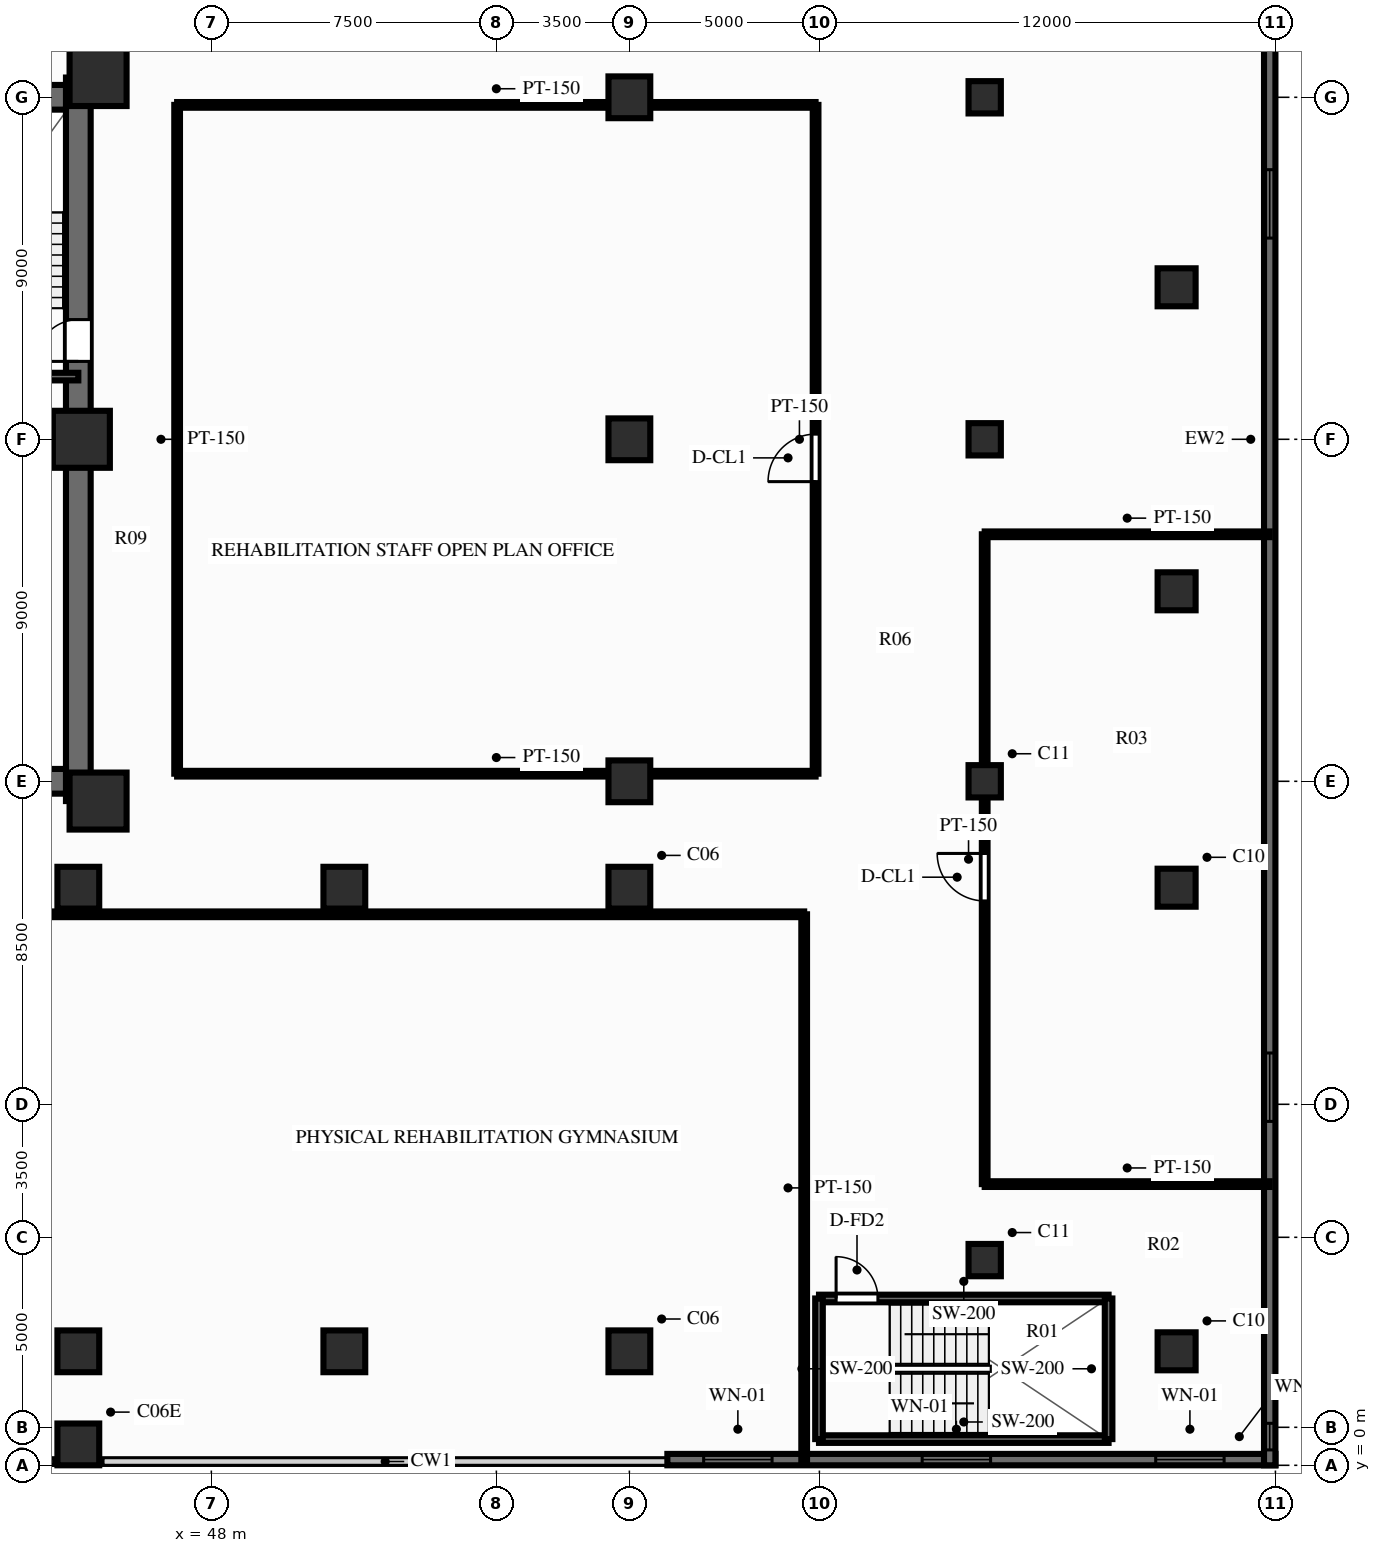
"""IFC4 building model, lengths in metres.
Left out: names, types, materials, properties, quantities, classifications, styles, units other than length and angle.
Written with IfcOpenShell. Run it as: python <this file> out.ifc"""

import sys

from ifc_helpers import new_model, si_unit, direction, frame, frame_2d, origin, origin_2d, place, context, subcontext, project, spatial, rectangle, circle, extrude, source, transform, mapped, element, fill, save


model = new_model("IFC4")
c1 = context("Model", 3, precision=1e-05, world=origin(), true_north=direction((0.0, 1.0)))
c2 = subcontext(c1, "Body", "Model", "MODEL_VIEW")
j1 = project(units=[si_unit("LENGTHUNIT", "METRE"), si_unit("PLANEANGLEUNIT", "RADIAN")], contexts=[c1])
p1 = place(None, origin())
s1 = spatial("IfcSite", under=j1, at=p1, CompositionType="ELEMENT")
p2 = place(p1, origin())
s2 = spatial("IfcBuilding", under=s1, at=p2, CompositionType="ELEMENT")
p3 = place(p2, frame((0.0, 0.0, 11.4)))
s3 = spatial("IfcBuildingStorey", under=s2, at=p3, CompositionType="ELEMENT", Elevation=11.4)
p4 = place(p3, frame((44.5, 17.48, 0.0), z_axis=(0.0, 0.0, 1.0), x_axis=(0.0, 1.0, 0.0)))
e1 = element("IfcWall", 1, at=p4, inside=s3, PredefinedType="SHEAR", context=c2, shape_type="SweptSolid", body=[
    extrude(rectangle(XDim=19.04, YDim=0.65, at=frame_2d((9.52, 0.0))), origin(), (0.0, 0.0, 1.0), 3.6),
])
p5 = place(p4, frame((12.67, 0.0, 0.0), z_axis=(0.0, 0.0, 1.0), x_axis=(-1.0, 0.0, 0.0)))
e2 = element("IfcOpeningElement", 2, at=p5, cuts=e1, PredefinedType="OPENING", context=c2, shape_type="SweptSolid", body=[
    extrude(rectangle(XDim=1.1, YDim=2.15, at=frame_2d((0.55, 1.075))), frame((0.0, 0.337, 0.0), z_axis=(0.0, -1.0, 0.0), x_axis=(1.0, 0.0, 0.0)), (0.0, 0.0, 1.0), 0.674),
])
p6 = place(p3, frame((31.825, 18.0, 0.0), z_axis=(0.0, 0.0, 1.0), x_axis=(1.0, 0.0, 0.0)))
e3 = element("IfcWall", 3, at=p6, inside=s3, PredefinedType="SHEAR", context=c2, shape_type="SweptSolid", body=[
    extrude(rectangle(XDim=12.35, YDim=0.65, at=frame_2d((6.175, 0.0))), origin(), (0.0, 0.0, 1.0), 3.6),
])
p7 = place(p3, frame((31.825, 36.0, 0.0), z_axis=(0.0, 0.0, 1.0), x_axis=(1.0, 0.0, 0.0)))
e4 = element("IfcWall", 4, at=p7, inside=s3, PredefinedType="SHEAR", context=c2, shape_type="SweptSolid", body=[
    extrude(rectangle(XDim=12.35, YDim=0.65, at=frame_2d((6.175, 0.0))), origin(), (0.0, 0.0, 1.0), 3.6),
])
p8 = place(p7, frame((5.125, 0.0, 0.0), z_axis=(0.0, 0.0, 1.0), x_axis=(-1.0, 0.0, 0.0)))
e5 = element("IfcOpeningElement", 5, at=p8, cuts=e4, PredefinedType="OPENING", context=c2, shape_type="SweptSolid", body=[
    extrude(rectangle(XDim=1.4, YDim=2.15, at=frame_2d((0.7, 1.075))), frame((0.0, 0.337, 0.0), z_axis=(0.0, -1.0, 0.0), x_axis=(1.0, 0.0, 0.0)), (0.0, 0.0, 1.0), 0.674),
])
m1 = source(origin(), c2, "Body", "SweptSolid", [
    extrude(rectangle(XDim=1.5, YDim=1.5, at=origin_2d()), origin(), (0.0, 0.0, 1.0), 3.6),
])
for number, where, z_axis, x_axis in (
    (6, (45.02, 17.48, 0.0), (0.0, 0.0, 1.0), (1.0, 0.0, 0.0)),
    (7, (45.02, 36.52, 0.0), (0.0, 0.0, 1.0), (1.0, 0.0, 0.0)),
    (8, (44.58, 27.0, 0.0), (0.0, 0.0, 1.0), (1.0, 0.0, 0.0)),
):
    element("IfcColumn", number, at=place(p3, frame(where, z_axis=z_axis, x_axis=x_axis)), inside=s3, PredefinedType="COLUMN", context=c2, shape_type="MappedRepresentation", body=[
        mapped(m1, transform((0.0, 0.0, 0.0), scale=1.0)),
    ])
m2 = source(origin(), c2, "Body", "SweptSolid", [
    extrude(circle(Radius=0.5, at=origin_2d()), origin(), (0.0, 0.0, 1.0), 3.6),
])
for number, where, z_axis, x_axis in (
    (9, (73.4, 3.0, 0.0), (0.0, 0.0, 1.0), (1.0, 0.0, 0.0)),
    (10, (73.4, 15.2, 0.0), (0.0, 0.0, 1.0), (1.0, 0.0, 0.0)),
    (11, (73.4, 23.0, 0.0), (0.0, 0.0, 1.0), (1.0, 0.0, 0.0)),
    (12, (73.4, 31.0, 0.0), (0.0, 0.0, 1.0), (1.0, 0.0, 0.0)),
):
    element("IfcColumn", number, at=place(p3, frame(where, z_axis=z_axis, x_axis=x_axis)), inside=s3, PredefinedType="COLUMN", context=c2, shape_type="MappedRepresentation", body=[
        mapped(m2, transform((0.0, 0.0, 0.0), scale=1.0)),
    ])
m3 = source(origin(), c2, "Body", "SweptSolid", [
    extrude(circle(Radius=0.425, at=origin_2d()), origin(), (0.0, 0.0, 1.0), 3.6),
])
for number, where, z_axis, x_axis in (
    (13, (68.35, 5.4, 0.0), (0.0, 0.0, 1.0), (1.0, 0.0, 0.0)),
    (14, (68.35, 18.0, 0.0), (0.0, 0.0, 1.0), (1.0, 0.0, 0.0)),
    (15, (68.35, 27.0, 0.0), (0.0, 0.0, 1.0), (1.0, 0.0, 0.0)),
    (16, (68.35, 36.0, 0.0), (0.0, 0.0, 1.0), (1.0, 0.0, 0.0)),
):
    element("IfcColumn", number, at=place(p3, frame(where, z_axis=z_axis, x_axis=x_axis)), inside=s3, PredefinedType="COLUMN", context=c2, shape_type="MappedRepresentation", body=[
        mapped(m3, transform((0.0, 0.0, 0.0), scale=1.0)),
    ])
m4 = source(origin(), c2, "Body", "SweptSolid", [
    extrude(rectangle(XDim=1.1, YDim=1.1, at=origin_2d()), origin(), (0.0, 0.0, 1.0), 3.6),
])
for number, where, z_axis, x_axis in (
    (17, (59.0, 3.0, 0.0), (0.0, 0.0, 1.0), (1.0, 0.0, 0.0)),
    (18, (59.0, 15.2, 0.0), (0.0, 0.0, 1.0), (1.0, 0.0, 0.0)),
    (19, (59.0, 18.0, 0.0), (0.0, 0.0, 1.0), (1.0, 0.0, 0.0)),
    (20, (59.0, 27.0, 0.0), (0.0, 0.0, 1.0), (1.0, 0.0, 0.0)),
    (21, (59.0, 36.0, 0.0), (0.0, 0.0, 1.0), (1.0, 0.0, 0.0)),
    (22, (44.5, 0.55, 0.0), (0.0, 0.0, 1.0), (1.0, 0.0, 0.0)),
    (23, (44.5, 3.0, 0.0), (0.0, 0.0, 1.0), (1.0, 0.0, 0.0)),
    (24, (44.5, 15.2, 0.0), (0.0, 0.0, 1.0), (1.0, 0.0, 0.0)),
    (25, (51.5, 3.0, 0.0), (0.0, 0.0, 1.0), (1.0, 0.0, 0.0)),
    (26, (51.5, 15.2, 0.0), (0.0, 0.0, 1.0), (1.0, 0.0, 0.0)),
):
    element("IfcColumn", number, at=place(p3, frame(where, z_axis=z_axis, x_axis=x_axis)), inside=s3, PredefinedType="COLUMN", context=c2, shape_type="MappedRepresentation", body=[
        mapped(m4, transform((0.0, 0.0, 0.0), scale=1.0)),
    ])
p9 = place(p3, frame((60.0, 0.15, 0.0), z_axis=(0.0, 0.0, 1.0), x_axis=(1.0, 0.0, 0.0)))
e27 = element("IfcWall", 27, at=p9, inside=s3, PredefinedType="SOLIDWALL", context=c2, shape_type="SweptSolid", body=[
    extrude(rectangle(XDim=16.0, YDim=0.3, at=frame_2d((8.0, 0.0))), origin(), (0.0, 0.0, 1.0), 2.88),
])
p10 = place(p9, frame((0.955, 0.0, 0.85)))
e28 = element("IfcOpeningElement", 28, at=p10, cuts=e27, PredefinedType="OPENING", context=c2, shape_type="SweptSolid", body=[
    extrude(rectangle(XDim=1.8, YDim=1.65, at=frame_2d((0.9, 0.825))), frame((0.0, 0.162, 0.0), z_axis=(0.0, -1.0, 0.0), x_axis=(1.0, 0.0, 0.0)), (0.0, 0.0, 1.0), 0.324),
])
p11 = place(p9, frame((6.705, 0.0, 0.85)))
e29 = element("IfcOpeningElement", 29, at=p11, cuts=e27, PredefinedType="OPENING", context=c2, shape_type="SweptSolid", body=[
    extrude(rectangle(XDim=1.8, YDim=1.65, at=frame_2d((0.9, 0.825))), frame((0.0, 0.162, 0.0), z_axis=(0.0, -1.0, 0.0), x_axis=(1.0, 0.0, 0.0)), (0.0, 0.0, 1.0), 0.324),
])
p12 = place(p9, frame((12.85, 0.0, 0.85)))
e30 = element("IfcOpeningElement", 30, at=p12, cuts=e27, PredefinedType="OPENING", context=c2, shape_type="SweptSolid", body=[
    extrude(rectangle(XDim=1.8, YDim=1.65, at=frame_2d((0.9, 0.825))), frame((0.0, 0.162, 0.0), z_axis=(0.0, -1.0, 0.0), x_axis=(1.0, 0.0, 0.0)), (0.0, 0.0, 1.0), 0.324),
])
p13 = place(p3, frame((75.85, 0.0, 0.0), z_axis=(0.0, 0.0, 1.0), x_axis=(0.0, 1.0, 0.0)))
e31 = element("IfcWall", 31, at=p13, inside=s3, PredefinedType="SOLIDWALL", context=c2, shape_type="SweptSolid", body=[
    extrude(rectangle(XDim=54.0, YDim=0.3, at=frame_2d((27.0, 0.0))), origin(), (0.0, 0.0, 1.0), 2.88),
])
p14 = place(p13, frame((0.405, 0.0, 0.85)))
e32 = element("IfcOpeningElement", 32, at=p14, cuts=e31, PredefinedType="OPENING", context=c2, shape_type="SweptSolid", body=[
    extrude(rectangle(XDim=0.7, YDim=1.5, at=frame_2d((0.35, 0.75))), frame((0.0, 0.162, 0.0), z_axis=(0.0, -1.0, 0.0), x_axis=(1.0, 0.0, 0.0)), (0.0, 0.0, 1.0), 0.324),
])
p15 = place(p13, frame((9.05, 0.0, 0.85)))
e33 = element("IfcOpeningElement", 33, at=p15, cuts=e31, PredefinedType="OPENING", context=c2, shape_type="SweptSolid", body=[
    extrude(rectangle(XDim=1.8, YDim=1.65, at=frame_2d((0.9, 0.825))), frame((0.0, 0.162, 0.0), z_axis=(0.0, -1.0, 0.0), x_axis=(1.0, 0.0, 0.0)), (0.0, 0.0, 1.0), 0.324),
])
p16 = place(p13, frame((32.295, 0.0, 0.85)))
e34 = element("IfcOpeningElement", 34, at=p16, cuts=e31, PredefinedType="OPENING", context=c2, shape_type="SweptSolid", body=[
    extrude(rectangle(XDim=1.8, YDim=1.65, at=frame_2d((0.9, 0.825))), frame((0.0, 0.162, 0.0), z_axis=(0.0, -1.0, 0.0), x_axis=(1.0, 0.0, 0.0)), (0.0, 0.0, 1.0), 0.324),
])
p17 = place(p3, frame((40.57, 28.65, 0.0), z_axis=(0.0, 0.0, 1.0), x_axis=(1.0, 0.0, 0.0)))
e35 = element("IfcWall", 35, at=p17, inside=s3, PredefinedType="SOLIDWALL", context=c2, shape_type="SweptSolid", body=[
    extrude(rectangle(XDim=3.93, YDim=0.2, at=frame_2d((1.965, 0.0))), origin(), (0.0, 0.0, 1.0), 3.25),
])
p18 = place(p3, frame((63.99, 0.69, 0.0), z_axis=(0.0, 0.0, 1.0), x_axis=(1.0, 0.0, 0.0)))
e36 = element("IfcWall", 36, at=p18, inside=s3, PredefinedType="SOLIDWALL", context=c2, shape_type="SweptSolid", body=[
    extrude(rectangle(XDim=7.62, YDim=0.2, at=frame_2d((3.81, 0.0))), origin(), (0.0, 0.0, 1.0), 3.25),
])
p19 = place(p3, frame((63.99, 4.39, 0.0), z_axis=(0.0, 0.0, 1.0), x_axis=(1.0, 0.0, 0.0)))
e37 = element("IfcWall", 37, at=p19, inside=s3, PredefinedType="SOLIDWALL", context=c2, shape_type="SweptSolid", body=[
    extrude(rectangle(XDim=7.62, YDim=0.2, at=frame_2d((3.81, 0.0))), origin(), (0.0, 0.0, 1.0), 3.25),
])
p20 = place(p19, frame((0.45, 0.0, 0.0)))
e38 = element("IfcOpeningElement", 38, at=p20, cuts=e37, PredefinedType="OPENING", context=c2, shape_type="SweptSolid", body=[
    extrude(rectangle(XDim=1.1, YDim=2.15, at=frame_2d((0.55, 1.075))), frame((0.0, 0.112, 0.0), z_axis=(0.0, -1.0, 0.0), x_axis=(1.0, 0.0, 0.0)), (0.0, 0.0, 1.0), 0.224),
])
for number, where, z_axis, x_axis in (
    (39, (63.99, 0.69, 0.0), (0.0, 0.0, 1.0), (0.0, 1.0, 0.0)),
    (40, (71.61, 0.69, 0.0), (0.0, 0.0, 1.0), (0.0, 1.0, 0.0)),
):
    element("IfcWall", number, at=place(p3, frame(where, z_axis=z_axis, x_axis=x_axis)), inside=s3, PredefinedType="SOLIDWALL", context=c2, shape_type="SweptSolid", body=[
        extrude(rectangle(XDim=3.7, YDim=0.2, at=frame_2d((1.85, 0.0))), origin(), (0.0, 0.0, 1.0), 3.25),
    ])
p21 = place(p3, frame((19.9, 14.5, 0.0), z_axis=(0.0, 0.0, 1.0), x_axis=(1.0, 0.0, 0.0)))
e41 = element("IfcWall", 41, at=p21, inside=s3, PredefinedType="PARTITIONING", context=c2, shape_type="SweptSolid", body=[
    extrude(rectangle(XDim=43.7, YDim=0.15, at=frame_2d((21.85, 0.0))), origin(), (0.0, 0.0, 1.0), 3.25),
])
p22 = place(p21, frame((19.92, 0.0, 0.0)))
e42 = element("IfcOpeningElement", 42, at=p22, cuts=e41, PredefinedType="OPENING", context=c2, shape_type="SweptSolid", body=[
    extrude(rectangle(XDim=1.25, YDim=2.15, at=frame_2d((0.625, 1.075))), frame((0.0, 0.087, 0.0), z_axis=(0.0, -1.0, 0.0), x_axis=(1.0, 0.0, 0.0)), (0.0, 0.0, 1.0), 0.174),
])
p23 = place(p3, frame((63.6, 0.1, 0.0), z_axis=(0.0, 0.0, 1.0), x_axis=(0.0, 1.0, 0.0)))
e43 = element("IfcWall", 43, at=p23, inside=s3, PredefinedType="PARTITIONING", context=c2, shape_type="SweptSolid", body=[
    extrude(rectangle(XDim=14.4, YDim=0.15, at=frame_2d((7.2, 0.0))), origin(), (0.0, 0.0, 1.0), 3.25),
])
for number, where, z_axis, x_axis in (
    (44, (68.35, 7.4, 0.0), (0.0, 0.0, 1.0), (1.0, 0.0, 0.0)),
    (45, (68.35, 24.5, 0.0), (0.0, 0.0, 1.0), (1.0, 0.0, 0.0)),
):
    element("IfcWall", number, at=place(p3, frame(where, z_axis=z_axis, x_axis=x_axis)), inside=s3, PredefinedType="PARTITIONING", context=c2, shape_type="SweptSolid", body=[
        extrude(rectangle(XDim=7.5, YDim=0.15, at=frame_2d((3.75, 0.0))), origin(), (0.0, 0.0, 1.0), 3.25),
    ])
p24 = place(p3, frame((68.35, 7.4, 0.0), z_axis=(0.0, 0.0, 1.0), x_axis=(0.0, 1.0, 0.0)))
e46 = element("IfcWall", 46, at=p24, inside=s3, PredefinedType="PARTITIONING", context=c2, shape_type="SweptSolid", body=[
    extrude(rectangle(XDim=17.1, YDim=0.15, at=frame_2d((8.55, 0.0))), origin(), (0.0, 0.0, 1.0), 2.84),
])
p25 = place(p24, frame((7.452, 0.0, 0.0)))
e47 = element("IfcOpeningElement", 47, at=p25, cuts=e46, PredefinedType="OPENING", context=c2, shape_type="SweptSolid", body=[
    extrude(rectangle(XDim=1.25, YDim=2.15, at=frame_2d((0.625, 1.075))), frame((0.0, 0.087, 0.0), z_axis=(0.0, -1.0, 0.0), x_axis=(1.0, 0.0, 0.0)), (0.0, 0.0, 1.0), 0.174),
])
for number, where, z_axis, x_axis in (
    (48, (47.1, 18.2, 0.0), (0.0, 0.0, 1.0), (1.0, 0.0, 0.0)),
    (49, (47.1, 35.8, 0.0), (0.0, 0.0, 1.0), (1.0, 0.0, 0.0)),
):
    element("IfcWall", number, at=place(p3, frame(where, z_axis=z_axis, x_axis=x_axis)), inside=s3, PredefinedType="PARTITIONING", context=c2, shape_type="SweptSolid", body=[
        extrude(rectangle(XDim=16.8, YDim=0.15, at=frame_2d((8.4, 0.0))), origin(), (0.0, 0.0, 1.0), 3.25),
    ])
p26 = place(p3, frame((47.1, 18.2, 0.0), z_axis=(0.0, 0.0, 1.0), x_axis=(0.0, 1.0, 0.0)))
e50 = element("IfcWall", 50, at=p26, inside=s3, PredefinedType="PARTITIONING", context=c2, shape_type="SweptSolid", body=[
    extrude(rectangle(XDim=17.6, YDim=0.15, at=frame_2d((8.8, 0.0))), origin(), (0.0, 0.0, 1.0), 3.25),
])
p27 = place(p3, frame((63.9, 18.2, 0.0), z_axis=(0.0, 0.0, 1.0), x_axis=(0.0, 1.0, 0.0)))
e51 = element("IfcWall", 51, at=p27, inside=s3, PredefinedType="PARTITIONING", context=c2, shape_type="SweptSolid", body=[
    extrude(rectangle(XDim=17.6, YDim=0.15, at=frame_2d((8.8, 0.0))), origin(), (0.0, 0.0, 1.0), 3.25),
])
p28 = place(p27, frame((7.686, 0.0, 0.0)))
e52 = element("IfcOpeningElement", 52, at=p28, cuts=e51, PredefinedType="OPENING", context=c2, shape_type="SweptSolid", body=[
    extrude(rectangle(XDim=1.25, YDim=2.15, at=frame_2d((0.625, 1.075))), frame((0.0, 0.087, 0.0), z_axis=(0.0, -1.0, 0.0), x_axis=(1.0, 0.0, 0.0)), (0.0, 0.0, 1.0), 0.174),
])
m5 = source(origin(), c2, "Body", "SweptSolid", [
    extrude(rectangle(XDim=1.8, YDim=1.65, at=frame_2d((0.9, 0.825))), frame((0.0, 0.03, 0.0), z_axis=(0.0, -1.0, 0.0), x_axis=(1.0, 0.0, 0.0)), (0.0, 0.0, 1.0), 0.06),
])
p29 = place(p10, origin())
e53 = element("IfcWindow", 53, at=p29, inside=s3, PartitioningType="SINGLE_PANEL", PredefinedType="WINDOW", context=c2, shape_type="MappedRepresentation", body=[
    mapped(m5, transform((0.0, 0.0, 0.0), scale=1.0)),
])
fill(e28, e53)
p30 = place(p11, origin())
e54 = element("IfcWindow", 54, at=p30, inside=s3, PartitioningType="SINGLE_PANEL", PredefinedType="WINDOW", context=c2, shape_type="MappedRepresentation", body=[
    mapped(m5, transform((0.0, 0.0, 0.0), scale=1.0)),
])
fill(e29, e54)
p31 = place(p12, origin())
e55 = element("IfcWindow", 55, at=p31, inside=s3, PartitioningType="SINGLE_PANEL", PredefinedType="WINDOW", context=c2, shape_type="MappedRepresentation", body=[
    mapped(m5, transform((0.0, 0.0, 0.0), scale=1.0)),
])
fill(e30, e55)
m6 = source(origin(), c2, "Body", "SweptSolid", [
    extrude(rectangle(XDim=0.7, YDim=1.5, at=frame_2d((0.35, 0.75))), frame((0.0, 0.03, 0.0), z_axis=(0.0, -1.0, 0.0), x_axis=(1.0, 0.0, 0.0)), (0.0, 0.0, 1.0), 0.06),
])
p32 = place(p14, origin())
e56 = element("IfcWindow", 56, at=p32, inside=s3, PartitioningType="SINGLE_PANEL", PredefinedType="WINDOW", context=c2, shape_type="MappedRepresentation", body=[
    mapped(m6, transform((0.0, 0.0, 0.0), scale=1.0)),
])
fill(e32, e56)
p33 = place(p15, origin())
e57 = element("IfcWindow", 57, at=p33, inside=s3, PartitioningType="SINGLE_PANEL", PredefinedType="WINDOW", context=c2, shape_type="MappedRepresentation", body=[
    mapped(m5, transform((0.0, 0.0, 0.0), scale=1.0)),
])
fill(e33, e57)
p34 = place(p16, origin())
e58 = element("IfcWindow", 58, at=p34, inside=s3, PartitioningType="SINGLE_PANEL", PredefinedType="WINDOW", context=c2, shape_type="MappedRepresentation", body=[
    mapped(m5, transform((0.0, 0.0, 0.0), scale=1.0)),
])
fill(e34, e58)
m7 = source(origin(), c2, "Body", "SweptSolid", [
    extrude(rectangle(XDim=1.1, YDim=2.15, at=frame_2d((0.55, 1.075))), frame((0.0, 0.025, 0.0), z_axis=(0.0, -1.0, 0.0), x_axis=(1.0, 0.0, 0.0)), (0.0, 0.0, 1.0), 0.05),
])
p35 = place(p5, origin())
e59 = element("IfcDoor", 59, at=p35, inside=s3, OperationType="SINGLE_SWING_RIGHT", PredefinedType="DOOR", context=c2, shape_type="MappedRepresentation", body=[
    mapped(m7, transform((0.0, 0.0, 0.0), scale=1.0)),
])
fill(e2, e59)
p36 = place(p20, origin())
e60 = element("IfcDoor", 60, at=p36, inside=s3, OperationType="SINGLE_SWING_LEFT", PredefinedType="DOOR", context=c2, shape_type="MappedRepresentation", body=[
    mapped(m7, transform((0.0, 0.0, 0.0), scale=1.0)),
])
fill(e38, e60)
m8 = source(origin(), c2, "Body", "SweptSolid", [
    extrude(rectangle(XDim=1.25, YDim=2.15, at=frame_2d((0.625, 1.075))), frame((0.0, 0.025, 0.0), z_axis=(0.0, -1.0, 0.0), x_axis=(1.0, 0.0, 0.0)), (0.0, 0.0, 1.0), 0.05),
])
p37 = place(p25, origin())
e61 = element("IfcDoor", 61, at=p37, inside=s3, OperationType="SINGLE_SWING_RIGHT", PredefinedType="DOOR", context=c2, shape_type="MappedRepresentation", body=[
    mapped(m8, transform((0.0, 0.0, 0.0), scale=1.0)),
])
fill(e47, e61)
p38 = place(p28, origin())
e62 = element("IfcDoor", 62, at=p38, inside=s3, OperationType="SINGLE_SWING_LEFT", PredefinedType="DOOR", context=c2, shape_type="MappedRepresentation", body=[
    mapped(m8, transform((0.0, 0.0, 0.0), scale=1.0)),
])
fill(e52, e62)
save(model, sys.argv[1])
